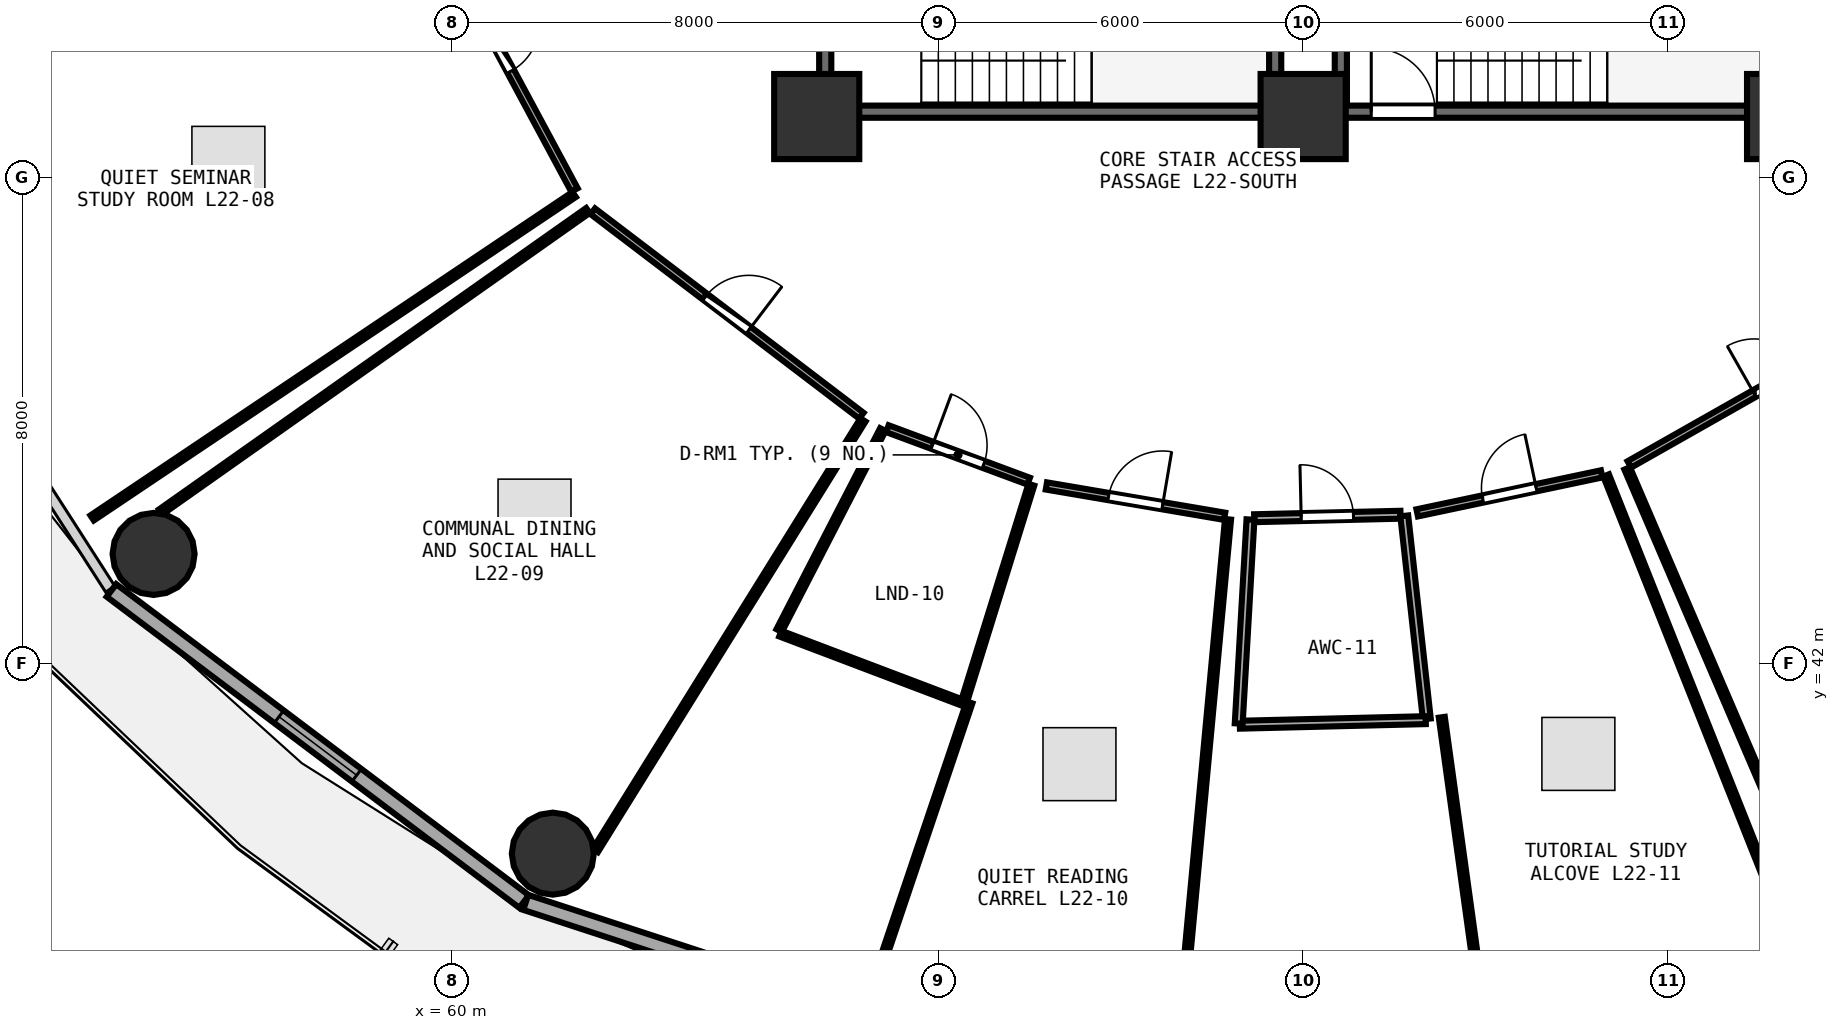
"""IFC4 building model, lengths in metres.
Left out: names, types, materials, properties, quantities, classifications, styles, units other than length and angle.
Written with IfcOpenShell. Run it as: python <this file> out.ifc"""

import sys

from ifc_helpers import new_model, si_unit, direction, frame, frame_2d, origin, origin_2d, place, context, subcontext, project, spatial, rectangle, circle, extrude, element, fill, save


model = new_model("IFC4")
c1 = context("Model", 3, precision=1e-05, world=origin(), true_north=direction((0.0, 1.0)))
c2 = subcontext(c1, "Body", "Model", "MODEL_VIEW")
j1 = project(units=[si_unit("LENGTHUNIT", "METRE"), si_unit("PLANEANGLEUNIT", "RADIAN")], contexts=[c1])
p1 = place(None, origin())
s1 = spatial("IfcSite", under=j1, at=p1, CompositionType="ELEMENT")
p2 = place(p1, origin())
s2 = spatial("IfcBuilding", under=s1, at=p2, CompositionType="ELEMENT")
p3 = place(p2, frame((0.0, 0.0, 87.6)))
s3 = spatial("IfcBuildingStorey", under=s2, at=p3, CompositionType="ELEMENT", Elevation=87.6)
for number, where, z_axis, x_axis in (
    (1, (66.0, 51.0, 0.0), (0.0, 0.0, 1.0), (1.0, 0.0, 0.0)),
    (2, (74.0, 51.0, 0.0), (0.0, 0.0, 1.0), (1.0, 0.0, 0.0)),
    (3, (82.0, 51.0, 0.0), (0.0, 0.0, 1.0), (1.0, 0.0, 0.0)),
):
    element("IfcColumn", number, at=place(p3, frame(where, z_axis=z_axis, x_axis=x_axis)), inside=s3, PredefinedType="PILASTER", context=c2, shape_type="SweptSolid", body=[
        extrude(rectangle(XDim=1.4, YDim=1.4, at=origin_2d()), origin(), (0.0, 0.0, 1.0), 3.75),
    ])
for number, where, z_axis, x_axis in (
    (4, (55.094, 43.807, 0.0), (0.0, 0.0, 1.0), (1.0, 0.0, 0.0)),
    (5, (61.66, 38.878, 0.0), (0.0, 0.0, 1.0), (1.0, 0.0, 0.0)),
):
    element("IfcColumn", number, at=place(p3, frame(where, z_axis=z_axis, x_axis=x_axis)), inside=s3, PredefinedType="COLUMN", context=c2, shape_type="SweptSolid", body=[
        extrude(circle(Radius=0.675, at=origin_2d()), origin(), (0.0, 0.0, 1.0), 3.75),
    ])
p4 = place(p3, frame((54.401, 43.207, 0.0), z_axis=(0.0, 0.0, 1.0), x_axis=(0.798501507879, -0.601992808857, 0.0)))
e6 = element("IfcWall", 6, at=p4, inside=s3, PredefinedType="SOLIDWALL", context=c2, shape_type="SweptSolid", body=[
    extrude(rectangle(XDim=8.499, YDim=0.26, at=frame_2d((4.25, 0.0))), origin(), (0.0, 0.0, 1.0), 3.475),
])
p5 = place(p4, frame((3.45, 0.0, 0.85)))
e7 = element("IfcOpeningElement", 7, at=p5, cuts=e6, PredefinedType="OPENING", context=c2, shape_type="SweptSolid", body=[
    extrude(rectangle(XDim=1.6, YDim=1.45, at=frame_2d((0.8, 0.725))), frame((0.0, 0.14, 0.0), z_axis=(0.0, -1.0, 0.0), x_axis=(1.0, 0.0, 0.0)), (0.0, 0.0, 1.0), 0.28),
])
p6 = place(p3, frame((61.214, 38.077, 0.0), z_axis=(0.0, 0.0, 1.0), x_axis=(0.950471101963, -0.310812941064, 0.0)))
e8 = element("IfcWall", 8, at=p6, inside=s3, PredefinedType="SOLIDWALL", context=c2, shape_type="SweptSolid", body=[
    extrude(rectangle(XDim=8.76, YDim=0.26, at=frame_2d((4.38, 0.0))), origin(), (0.0, 0.0, 1.0), 3.475),
])
p7 = place(p6, frame((3.58, 0.0, 0.85)))
e9 = element("IfcOpeningElement", 9, at=p7, cuts=e8, PredefinedType="OPENING", context=c2, shape_type="SweptSolid", body=[
    extrude(rectangle(XDim=1.6, YDim=1.45, at=frame_2d((0.8, 0.725))), frame((0.0, 0.14, 0.0), z_axis=(0.0, -1.0, 0.0), x_axis=(1.0, 0.0, 0.0)), (0.0, 0.0, 1.0), 0.28),
])
p8 = place(p3, frame((74.0, 51.08, 0.0), z_axis=(0.0, 0.0, 1.0), x_axis=(1.0, 0.0, 0.0)))
e10 = element("IfcWall", 10, at=p8, inside=s3, PredefinedType="SHEAR", context=c2, shape_type="SweptSolid", body=[
    extrude(rectangle(XDim=7.9, YDim=0.2, at=frame_2d((3.95, 0.0))), origin(), (0.0, 0.0, 1.0), 3.49),
])
p9 = place(p8, frame((1.12, 0.0, 0.0)))
e11 = element("IfcOpeningElement", 11, at=p9, cuts=e10, PredefinedType="OPENING", context=c2, shape_type="SweptSolid", body=[
    extrude(rectangle(XDim=1.05, YDim=2.1, at=frame_2d((0.525, 1.05))), frame((0.0, 0.11, 0.0), z_axis=(0.0, -1.0, 0.0), x_axis=(1.0, 0.0, 0.0)), (0.0, 0.0, 1.0), 0.22),
])
p10 = place(p3, frame((74.62, 54.27, 0.0), z_axis=(0.0, 0.0, 1.0), x_axis=(0.0, -1.0, 0.0)))
e12 = element("IfcWall", 12, at=p10, inside=s3, PredefinedType="SHEAR", context=c2, shape_type="SweptSolid", body=[
    extrude(rectangle(XDim=3.07, YDim=0.2, at=frame_2d((1.535, 0.0))), origin(), (0.0, 0.0, 1.0), 3.49),
])
p11 = place(p3, frame((66.26, 51.08, 0.0), z_axis=(0.0, 0.0, 1.0), x_axis=(1.0, 0.0, 0.0)))
e13 = element("IfcWall", 13, at=p11, inside=s3, PredefinedType="SHEAR", context=c2, shape_type="SweptSolid", body=[
    extrude(rectangle(XDim=7.16, YDim=0.2, at=frame_2d((3.58, 0.0))), origin(), (0.0, 0.0, 1.0), 3.49),
])
p12 = place(p3, frame((73.54, 51.2, 0.0), z_axis=(0.0, 0.0, 1.0), x_axis=(0.0, 1.0, 0.0)))
e14 = element("IfcWall", 14, at=p12, inside=s3, PredefinedType="SHEAR", context=c2, shape_type="SweptSolid", body=[
    extrude(rectangle(XDim=3.07, YDim=0.2, at=frame_2d((1.535, 0.0))), origin(), (0.0, 0.0, 1.0), 3.49),
])
p13 = place(p3, frame((66.14, 54.27, 0.0), z_axis=(0.0, 0.0, 1.0), x_axis=(0.0, -1.0, 0.0)))
e15 = element("IfcWall", 15, at=p13, inside=s3, PredefinedType="SHEAR", context=c2, shape_type="SweptSolid", body=[
    extrude(rectangle(XDim=3.07, YDim=0.2, at=frame_2d((1.535, 0.0))), origin(), (0.0, 0.0, 1.0), 3.49),
])
p14 = place(p13, frame((1.01, 0.0, 0.0)))
e16 = element("IfcOpeningElement", 16, at=p14, cuts=e15, PredefinedType="OPENING", context=c2, shape_type="SweptSolid", body=[
    extrude(rectangle(XDim=1.05, YDim=2.1, at=frame_2d((0.525, 1.05))), frame((0.0, 0.11, 0.0), z_axis=(0.0, -1.0, 0.0), x_axis=(1.0, 0.0, 0.0)), (0.0, 0.0, 1.0), 0.22),
])
p15 = place(p3, frame((59.49, 54.488, 0.0), z_axis=(0.0, 0.0, 1.0), x_axis=(0.473630069111, -0.880723882743, 0.0)))
e17 = element("IfcWall", 17, at=p15, inside=s3, PredefinedType="PARTITIONING", context=c2, shape_type="SweptSolid", body=[
    extrude(rectangle(XDim=5.332, YDim=0.12, at=frame_2d((2.666, 0.0))), origin(), (0.0, 0.0, 1.0), 2.925),
])
p16 = place(p15, frame((2.216, 0.0, 0.0)))
e18 = element("IfcOpeningElement", 18, at=p16, cuts=e17, PredefinedType="OPENING", context=c2, shape_type="SweptSolid", body=[
    extrude(rectangle(XDim=0.9, YDim=2.08, at=frame_2d((0.45, 1.04))), frame((0.0, 0.07, 0.0), z_axis=(0.0, -1.0, 0.0), x_axis=(1.0, 0.0, 0.0)), (0.0, 0.0, 1.0), 0.14),
])
p17 = place(p3, frame((62.318, 49.442, 0.0), z_axis=(0.0, 0.0, 1.0), x_axis=(0.795762794985, -0.605608432997, 0.0)))
e19 = element("IfcWall", 19, at=p17, inside=s3, PredefinedType="PARTITIONING", context=c2, shape_type="SweptSolid", body=[
    extrude(rectangle(XDim=5.55, YDim=0.12, at=frame_2d((2.775, 0.0))), origin(), (0.0, 0.0, 1.0), 2.925),
])
p18 = place(p17, frame((2.325, 0.0, 0.0)))
e20 = element("IfcOpeningElement", 20, at=p18, cuts=e19, PredefinedType="OPENING", context=c2, shape_type="SweptSolid", body=[
    extrude(rectangle(XDim=0.9, YDim=2.08, at=frame_2d((0.45, 1.04))), frame((0.0, 0.07, 0.0), z_axis=(0.0, -1.0, 0.0), x_axis=(1.0, 0.0, 0.0)), (0.0, 0.0, 1.0), 0.14),
])
p19 = place(p3, frame((67.162, 45.867, 0.0), z_axis=(0.0, 0.0, 1.0), x_axis=(0.937401389833, -0.348250821018, 0.0)))
e21 = element("IfcWall", 21, at=p19, inside=s3, PredefinedType="PARTITIONING", context=c2, shape_type="SweptSolid", body=[
    extrude(rectangle(XDim=2.479, YDim=0.12, at=frame_2d((1.24, 0.0))), origin(), (0.0, 0.0, 1.0), 2.925),
])
p20 = place(p19, frame((0.789, 0.0, 0.0)))
e22 = element("IfcOpeningElement", 22, at=p20, cuts=e21, PredefinedType="OPENING", context=c2, shape_type="SweptSolid", body=[
    extrude(rectangle(XDim=0.9, YDim=2.08, at=frame_2d((0.45, 1.04))), frame((0.0, 0.07, 0.0), z_axis=(0.0, -1.0, 0.0), x_axis=(1.0, 0.0, 0.0)), (0.0, 0.0, 1.0), 0.14),
])
p21 = place(p3, frame((69.777, 44.925, 0.0), z_axis=(0.0, 0.0, 1.0), x_axis=(0.985835901267, -0.167712777608, 0.0)))
e23 = element("IfcWall", 23, at=p21, inside=s3, PredefinedType="PARTITIONING", context=c2, shape_type="SweptSolid", body=[
    extrude(rectangle(XDim=2.974, YDim=0.12, at=frame_2d((1.487, 0.0))), origin(), (0.0, 0.0, 1.0), 3.48),
])
p22 = place(p21, frame((1.037, 0.0, 0.0)))
e24 = element("IfcOpeningElement", 24, at=p22, cuts=e23, PredefinedType="OPENING", context=c2, shape_type="SweptSolid", body=[
    extrude(rectangle(XDim=0.9, YDim=2.08, at=frame_2d((0.45, 1.04))), frame((0.0, 0.07, 0.0), z_axis=(0.0, -1.0, 0.0), x_axis=(1.0, 0.0, 0.0)), (0.0, 0.0, 1.0), 0.14),
])
p23 = place(p3, frame((73.195, 44.394, 0.0), z_axis=(0.0, 0.0, 1.0), x_axis=(0.999715810971, 0.023838986867, 0.0)))
e25 = element("IfcWall", 25, at=p23, inside=s3, PredefinedType="PLUMBINGWALL", context=c2, shape_type="SweptSolid", body=[
    extrude(rectangle(XDim=2.407, YDim=0.13, at=frame_2d((1.203, 0.0))), origin(), (0.0, 0.0, 1.0), 3.48),
])
p24 = place(p23, frame((0.773, 0.0, 0.0)))
e26 = element("IfcOpeningElement", 26, at=p24, cuts=e25, PredefinedType="OPENING", context=c2, shape_type="SweptSolid", body=[
    extrude(rectangle(XDim=0.86, YDim=2.05, at=frame_2d((0.43, 1.025))), frame((0.0, 0.075, 0.0), z_axis=(0.0, -1.0, 0.0), x_axis=(1.0, 0.0, 0.0)), (0.0, 0.0, 1.0), 0.15),
])
p25 = place(p3, frame((75.876, 44.482, 0.0), z_axis=(0.0, 0.0, 1.0), x_axis=(0.978387400111, 0.206780306856, 0.0)))
e27 = element("IfcWall", 27, at=p25, inside=s3, PredefinedType="PARTITIONING", context=c2, shape_type="SweptSolid", body=[
    extrude(rectangle(XDim=3.1, YDim=0.12, at=frame_2d((1.55, 0.0))), origin(), (0.0, 0.0, 1.0), 3.48),
])
p26 = place(p25, frame((1.1, 0.0, 0.0)))
e28 = element("IfcOpeningElement", 28, at=p26, cuts=e27, PredefinedType="OPENING", context=c2, shape_type="SweptSolid", body=[
    extrude(rectangle(XDim=0.9, YDim=2.08, at=frame_2d((0.45, 1.04))), frame((0.0, 0.07, 0.0), z_axis=(0.0, -1.0, 0.0), x_axis=(1.0, 0.0, 0.0)), (0.0, 0.0, 1.0), 0.14),
])
p27 = place(p3, frame((79.365, 45.28, 0.0), z_axis=(0.0, 0.0, 1.0), x_axis=(0.870068136537, 0.49293147372, 0.0)))
e29 = element("IfcWall", 29, at=p27, inside=s3, PredefinedType="PARTITIONING", context=c2, shape_type="SweptSolid", body=[
    extrude(rectangle(XDim=5.621, YDim=0.12, at=frame_2d((2.811, 0.0))), origin(), (0.0, 0.0, 1.0), 2.925),
])
p28 = place(p27, frame((2.36, 0.0, 0.0)))
e30 = element("IfcOpeningElement", 30, at=p28, cuts=e29, PredefinedType="OPENING", context=c2, shape_type="SweptSolid", body=[
    extrude(rectangle(XDim=0.9, YDim=2.08, at=frame_2d((0.45, 1.04))), frame((0.0, 0.07, 0.0), z_axis=(0.0, -1.0, 0.0), x_axis=(1.0, 0.0, 0.0)), (0.0, 0.0, 1.0), 0.14),
])
p29 = place(p3, frame((62.011, 49.718, 0.0), z_axis=(0.0, 0.0, 1.0), x_axis=(-0.830433607217, -0.557117603388, 0.0)))
e31 = element("IfcWall", 31, at=p29, inside=s3, PredefinedType="PARTITIONING", context=c2, shape_type="SweptSolid", body=[
    extrude(rectangle(XDim=9.546, YDim=0.1, at=frame_2d((4.773, 0.0))), origin(), (0.0, 0.0, 1.0), 2.975),
])
p30 = place(p3, frame((66.761, 46.01, 0.0), z_axis=(0.0, 0.0, 1.0), x_axis=(-0.528015738644, -0.849234584638, 0.0)))
e32 = element("IfcWall", 32, at=p30, inside=s3, PredefinedType="PARTITIONING", context=c2, shape_type="SweptSolid", body=[
    extrude(rectangle(XDim=8.338, YDim=0.1, at=frame_2d((4.169, 0.0))), origin(), (0.0, 0.0, 1.0), 3.175),
])
p31 = place(p3, frame((55.21, 44.498, 0.0), z_axis=(0.0, 0.0, 1.0), x_axis=(0.817133838915, 0.576447993578, 0.0)))
e33 = element("IfcWall", 33, at=p31, inside=s3, PredefinedType="PARTITIONING", context=c2, shape_type="SweptSolid", body=[
    extrude(rectangle(XDim=8.6, YDim=0.1, at=frame_2d((4.3, 0.0))), origin(), (0.0, 0.0, 1.0), 3.175),
])
p32 = place(p3, frame((69.53, 44.945, 0.0), z_axis=(0.0, 0.0, 1.0), x_axis=(-0.296510682072, -0.955029536411, 0.0)))
e34 = element("IfcWall", 34, at=p32, inside=s3, PredefinedType="PARTITIONING", context=c2, shape_type="SweptSolid", body=[
    extrude(rectangle(XDim=3.72, YDim=0.1, at=frame_2d((1.86, 0.0))), origin(), (0.0, 0.0, 1.0), 2.925),
])
p33 = place(p3, frame((68.378, 41.368, 0.0), z_axis=(0.0, 0.0, 1.0), x_axis=(-0.935027341219, 0.354575621233, 0.0)))
e35 = element("IfcWall", 35, at=p33, inside=s3, PredefinedType="PARTITIONING", context=c2, shape_type="SweptSolid", body=[
    extrude(rectangle(XDim=3.183, YDim=0.1, at=frame_2d((1.592, 0.0))), origin(), (0.0, 0.0, 1.0), 2.925),
])
p34 = place(p3, frame((65.382, 42.546, 0.0), z_axis=(0.0, 0.0, 1.0), x_axis=(0.458413879464, 0.888738834031, 0.0)))
e36 = element("IfcWall", 36, at=p34, inside=s3, PredefinedType="PARTITIONING", context=c2, shape_type="SweptSolid", body=[
    extrude(rectangle(XDim=3.72, YDim=0.1, at=frame_2d((1.86, 0.0))), origin(), (0.0, 0.0, 1.0), 3.175),
])
p35 = place(p3, frame((72.764, 44.376, 0.0), z_axis=(0.0, 0.0, 1.0), x_axis=(-0.092917687898, -0.995673793607, 0.0)))
e37 = element("IfcWall", 37, at=p35, inside=s3, PredefinedType="PARTITIONING", context=c2, shape_type="SweptSolid", body=[
    extrude(rectangle(XDim=8.779, YDim=0.1, at=frame_2d((4.389, 0.0))), origin(), (0.0, 0.0, 1.0), 2.975),
])
p36 = place(p3, frame((66.867, 36.49, 0.0), z_axis=(0.0, 0.0, 1.0), x_axis=(0.319911741109, 0.947447348353, 0.0)))
e38 = element("IfcWall", 38, at=p36, inside=s3, PredefinedType="PARTITIONING", context=c2, shape_type="SweptSolid", body=[
    extrude(rectangle(XDim=5.146, YDim=0.1, at=frame_2d((2.573, 0.0))), origin(), (0.0, 0.0, 1.0), 2.925),
])
p37 = place(p3, frame((75.663, 44.433, 0.0), z_axis=(0.0, 0.0, 1.0), x_axis=(0.110311886913, -0.993897020624, 0.0)))
e39 = element("IfcWall", 39, at=p37, inside=s3, PredefinedType="PLUMBINGWALL", context=c2, shape_type="SweptSolid", body=[
    extrude(rectangle(XDim=3.36, YDim=0.13, at=frame_2d((1.68, 0.0))), origin(), (0.0, 0.0, 1.0), 3.175),
])
p38 = place(p3, frame((76.016, 41.073, 0.0), z_axis=(0.0, 0.0, 1.0), x_axis=(-0.999699597441, -0.024509485419, 0.0)))
e40 = element("IfcWall", 40, at=p38, inside=s3, PredefinedType="PLUMBINGWALL", context=c2, shape_type="SweptSolid", body=[
    extrude(rectangle(XDim=3.058, YDim=0.13, at=frame_2d((1.529, 0.0))), origin(), (0.0, 0.0, 1.0), 3.48),
])
p39 = place(p3, frame((72.94, 41.018, 0.0), z_axis=(0.0, 0.0, 1.0), x_axis=(0.057610459658, 0.998339138238, 0.0)))
e41 = element("IfcWall", 41, at=p39, inside=s3, PredefinedType="PLUMBINGWALL", context=c2, shape_type="SweptSolid", body=[
    extrude(rectangle(XDim=3.361, YDim=0.13, at=frame_2d((1.68, 0.0))), origin(), (0.0, 0.0, 1.0), 3.175),
])
p40 = place(p3, frame((78.983, 45.099, 0.0), z_axis=(0.0, 0.0, 1.0), x_axis=(0.369438475108, -0.929255192673, 0.0)))
e42 = element("IfcWall", 42, at=p40, inside=s3, PredefinedType="PARTITIONING", context=c2, shape_type="SweptSolid", body=[
    extrude(rectangle(XDim=8.909, YDim=0.1, at=frame_2d((4.455, 0.0))), origin(), (0.0, 0.0, 1.0), 2.925),
])
p41 = place(p3, frame((77.027, 35.725, 0.0), z_axis=(0.0, 0.0, 1.0), x_axis=(-0.136996790132, 0.990571491359, 0.0)))
e43 = element("IfcWall", 43, at=p41, inside=s3, PredefinedType="PARTITIONING", context=c2, shape_type="SweptSolid", body=[
    extrude(rectangle(XDim=5.448, YDim=0.1, at=frame_2d((2.724, 0.0))), origin(), (0.0, 0.0, 1.0), 2.975),
])
p42 = place(p3, frame((82.849, 37.008, 0.0), z_axis=(0.0, 0.0, 1.0), x_axis=(-0.394269081074, 0.918995044442, 0.0)))
e44 = element("IfcWall", 44, at=p42, inside=s3, PredefinedType="PARTITIONING", context=c2, shape_type="SweptSolid", body=[
    extrude(rectangle(XDim=8.928, YDim=0.1, at=frame_2d((4.464, 0.0))), origin(), (0.0, 0.0, 1.0), 2.925),
])
p43 = place(p5, origin())
e45 = element("IfcWindow", 45, at=p43, inside=s3, PartitioningType="SINGLE_PANEL", PredefinedType="WINDOW", context=c2, shape_type="SweptSolid", body=[
    extrude(rectangle(XDim=1.6, YDim=1.45, at=frame_2d((0.8, 0.725))), frame((0.0, 0.03, 0.0), z_axis=(0.0, -1.0, 0.0), x_axis=(1.0, 0.0, 0.0)), (0.0, 0.0, 1.0), 0.06),
])
fill(e7, e45)
p44 = place(p9, origin())
e46 = element("IfcDoor", 46, at=p44, inside=s3, OperationType="SINGLE_SWING_LEFT", PredefinedType="DOOR", context=c2, shape_type="SweptSolid", body=[
    extrude(rectangle(XDim=1.05, YDim=2.1, at=frame_2d((0.525, 1.05))), frame((0.0, 0.025, 0.0), z_axis=(0.0, -1.0, 0.0), x_axis=(1.0, 0.0, 0.0)), (0.0, 0.0, 1.0), 0.05),
])
fill(e11, e46)
p45 = place(p16, origin())
e47 = element("IfcDoor", 47, at=p45, inside=s3, OperationType="SINGLE_SWING_LEFT", PredefinedType="DOOR", context=c2, shape_type="SweptSolid", body=[
    extrude(rectangle(XDim=0.9, YDim=2.08, at=frame_2d((0.45, 1.04))), frame((0.0, 0.025, 0.0), z_axis=(0.0, -1.0, 0.0), x_axis=(1.0, 0.0, 0.0)), (0.0, 0.0, 1.0), 0.05),
])
fill(e18, e47)
p46 = place(p18, origin())
e48 = element("IfcDoor", 48, at=p46, inside=s3, OperationType="SINGLE_SWING_RIGHT", PredefinedType="DOOR", context=c2, shape_type="SweptSolid", body=[
    extrude(rectangle(XDim=0.9, YDim=2.08, at=frame_2d((0.45, 1.04))), frame((0.0, 0.025, 0.0), z_axis=(0.0, -1.0, 0.0), x_axis=(1.0, 0.0, 0.0)), (0.0, 0.0, 1.0), 0.05),
])
fill(e20, e48)
p47 = place(p20, origin())
e49 = element("IfcDoor", 49, at=p47, inside=s3, OperationType="SINGLE_SWING_LEFT", PredefinedType="DOOR", context=c2, shape_type="SweptSolid", body=[
    extrude(rectangle(XDim=0.9, YDim=2.08, at=frame_2d((0.45, 1.04))), frame((0.0, 0.025, 0.0), z_axis=(0.0, -1.0, 0.0), x_axis=(1.0, 0.0, 0.0)), (0.0, 0.0, 1.0), 0.05),
])
fill(e22, e49)
p48 = place(p22, origin())
e50 = element("IfcDoor", 50, at=p48, inside=s3, OperationType="SINGLE_SWING_RIGHT", PredefinedType="DOOR", context=c2, shape_type="SweptSolid", body=[
    extrude(rectangle(XDim=0.9, YDim=2.08, at=frame_2d((0.45, 1.04))), frame((0.0, 0.025, 0.0), z_axis=(0.0, -1.0, 0.0), x_axis=(1.0, 0.0, 0.0)), (0.0, 0.0, 1.0), 0.05),
])
fill(e24, e50)
p49 = place(p24, origin())
e51 = element("IfcDoor", 51, at=p49, inside=s3, OperationType="SINGLE_SWING_LEFT", PredefinedType="DOOR", context=c2, shape_type="SweptSolid", body=[
    extrude(rectangle(XDim=0.86, YDim=2.05, at=frame_2d((0.43, 1.025))), frame((0.0, 0.025, 0.0), z_axis=(0.0, -1.0, 0.0), x_axis=(1.0, 0.0, 0.0)), (0.0, 0.0, 1.0), 0.05),
])
fill(e26, e51)
p50 = place(p26, origin())
e52 = element("IfcDoor", 52, at=p50, inside=s3, OperationType="SINGLE_SWING_RIGHT", PredefinedType="DOOR", context=c2, shape_type="SweptSolid", body=[
    extrude(rectangle(XDim=0.9, YDim=2.08, at=frame_2d((0.45, 1.04))), frame((0.0, 0.025, 0.0), z_axis=(0.0, -1.0, 0.0), x_axis=(1.0, 0.0, 0.0)), (0.0, 0.0, 1.0), 0.05),
])
fill(e28, e52)
p51 = place(p28, origin())
e53 = element("IfcDoor", 53, at=p51, inside=s3, OperationType="SINGLE_SWING_LEFT", PredefinedType="DOOR", context=c2, shape_type="SweptSolid", body=[
    extrude(rectangle(XDim=0.9, YDim=2.08, at=frame_2d((0.45, 1.04))), frame((0.0, 0.025, 0.0), z_axis=(0.0, -1.0, 0.0), x_axis=(1.0, 0.0, 0.0)), (0.0, 0.0, 1.0), 0.05),
])
fill(e30, e53)
save(model, sys.argv[1])
